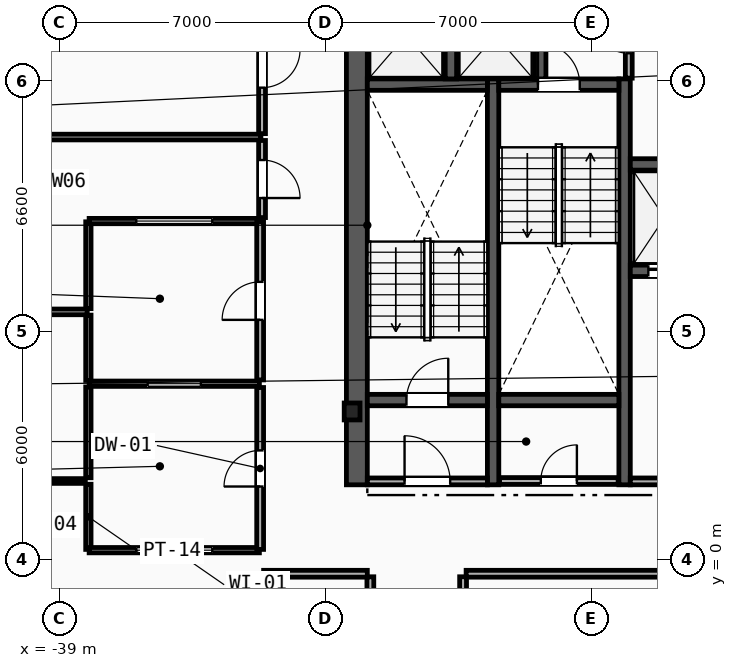
"""IFC4 building model, lengths in metres.
Left out: names, types, materials, properties, quantities, classifications, styles, units other than length and angle.
Written with IfcOpenShell. Run it as: python <this file> out.ifc"""

import sys

from ifc_helpers import new_model, si_unit, direction, frame, frame_2d, origin, origin_2d, place, context, subcontext, project, spatial, rectangle, i_section, extrude, element, fill, save


model = new_model("IFC4")
c1 = context("Model", 3, precision=1e-05, world=origin(), true_north=direction((0.0, 1.0)))
c2 = subcontext(c1, "Body", "Model", "MODEL_VIEW")
j1 = project(units=[si_unit("LENGTHUNIT", "METRE"), si_unit("PLANEANGLEUNIT", "RADIAN")], contexts=[c1])
p1 = place(None, origin())
s1 = spatial("IfcSite", under=j1, at=p1, CompositionType="ELEMENT")
p2 = place(p1, origin())
s2 = spatial("IfcBuilding", under=s1, at=p2, CompositionType="ELEMENT")
p3 = place(p2, frame((0.0, 0.0, 257.6)))
s3 = spatial("IfcBuildingStorey", under=s2, at=p3, CompositionType="ELEMENT", Elevation=257.6)
p4 = place(p3, frame((-31.3, 3.9, 0.0), z_axis=(0.0, 0.0, 1.0), x_axis=(1.0, 0.0, 0.0)))
e1 = element("IfcColumn", 1, at=p4, inside=s3, PredefinedType="COLUMN", context=c2, shape_type="SweptSolid", body=[
    extrude(i_section(OverallWidth=0.416, OverallDepth=0.446, WebThickness=0.039, FlangeThickness=0.063, FilletRadius=0.018, at=origin_2d()), origin(), (0.0, 0.0, 1.0), 3.6),
])
p5 = place(p3, frame((-31.175, 1.97, 0.0), z_axis=(0.0, 0.0, 1.0), x_axis=(0.0, 1.0, 0.0)))
e2 = element("IfcWall", 2, at=p5, inside=s3, PredefinedType="SHEAR", context=c2, shape_type="SweptSolid", body=[
    extrude(rectangle(XDim=13.33, YDim=0.55, at=frame_2d((6.665, 0.0))), origin(), (0.0, 0.0, 1.0), 3.34),
])
for number, where, z_axis, x_axis in (
    (3, (-27.59, 1.97, 0.0), (0.0, 0.0, 1.0), (0.0, 1.0, 0.0)),
    (4, (-24.13, 1.97, 0.0), (0.0, 0.0, 1.0), (0.0, 1.0, 0.0)),
):
    element("IfcWall", number, at=place(p3, frame(where, z_axis=z_axis, x_axis=x_axis)), inside=s3, PredefinedType="SHEAR", context=c2, shape_type="SweptSolid", body=[
        extrude(rectangle(XDim=10.68, YDim=0.3, at=frame_2d((5.34, 0.0))), origin(), (0.0, 0.0, 1.0), 3.34),
    ])
p6 = place(p3, frame((-30.9, 4.2, 0.0), z_axis=(0.0, 0.0, 1.0), x_axis=(1.0, 0.0, 0.0)))
e5 = element("IfcWall", 5, at=p6, inside=s3, PredefinedType="SHEAR", context=c2, shape_type="SweptSolid", body=[
    extrude(rectangle(XDim=3.16, YDim=0.3, at=frame_2d((1.58, 0.0))), origin(), (0.0, 0.0, 1.0), 3.34),
])
p7 = place(p6, frame((1.03, 0.0, 0.0)))
e6 = element("IfcOpeningElement", 6, at=p7, cuts=e5, PredefinedType="OPENING", context=c2, shape_type="SweptSolid", body=[
    extrude(rectangle(XDim=1.1, YDim=2.15, at=frame_2d((0.55, 1.075))), frame((0.0, 0.16, 0.0), z_axis=(0.0, -1.0, 0.0), x_axis=(1.0, 0.0, 0.0)), (0.0, 0.0, 1.0), 0.32),
])
p8 = place(p3, frame((-30.9, 12.5, 0.0), z_axis=(0.0, 0.0, 1.0), x_axis=(1.0, 0.0, 0.0)))
e7 = element("IfcWall", 7, at=p8, inside=s3, PredefinedType="SHEAR", context=c2, shape_type="SweptSolid", body=[
    extrude(rectangle(XDim=3.16, YDim=0.3, at=frame_2d((1.58, 0.0))), origin(), (0.0, 0.0, 1.0), 3.34),
])
p9 = place(p3, frame((-27.44, 12.5, 0.0), z_axis=(0.0, 0.0, 1.0), x_axis=(1.0, 0.0, 0.0)))
e8 = element("IfcWall", 8, at=p9, inside=s3, PredefinedType="SHEAR", context=c2, shape_type="SweptSolid", body=[
    extrude(rectangle(XDim=3.16, YDim=0.3, at=frame_2d((1.58, 0.0))), origin(), (0.0, 0.0, 1.0), 3.34),
])
p10 = place(p9, frame((1.03, 0.0, 0.0)))
e9 = element("IfcOpeningElement", 9, at=p10, cuts=e8, PredefinedType="OPENING", context=c2, shape_type="SweptSolid", body=[
    extrude(rectangle(XDim=1.1, YDim=2.15, at=frame_2d((0.55, 1.075))), frame((0.0, 0.16, 0.0), z_axis=(0.0, -1.0, 0.0), x_axis=(1.0, 0.0, 0.0)), (0.0, 0.0, 1.0), 0.32),
])
p11 = place(p3, frame((-27.44, 4.2, 0.0), z_axis=(0.0, 0.0, 1.0), x_axis=(1.0, 0.0, 0.0)))
e10 = element("IfcWall", 10, at=p11, inside=s3, PredefinedType="SHEAR", context=c2, shape_type="SweptSolid", body=[
    extrude(rectangle(XDim=3.16, YDim=0.3, at=frame_2d((1.58, 0.0))), origin(), (0.0, 0.0, 1.0), 3.34),
])
p12 = place(p3, frame((-23.98, 2.06, 0.0), z_axis=(0.0, 0.0, 1.0), x_axis=(1.0, 0.0, 0.0)))
e11 = element("IfcWall", 11, at=p12, inside=s3, PredefinedType="PARTITIONING", context=c2, shape_type="SweptSolid", body=[
    extrude(rectangle(XDim=3.0, YDim=0.18, at=frame_2d((1.5, 0.0))), origin(), (0.0, 0.0, 1.0), 3.34),
])
p13 = place(p12, frame((0.9, 0.0, 0.0)))
e12 = element("IfcOpeningElement", 12, at=p13, cuts=e11, PredefinedType="OPENING", context=c2, shape_type="SweptSolid", body=[
    extrude(rectangle(XDim=1.2, YDim=2.15, at=frame_2d((0.6, 1.075))), frame((0.0, 0.1, 0.0), z_axis=(0.0, -1.0, 0.0), x_axis=(1.0, 0.0, 0.0)), (0.0, 0.0, 1.0), 0.2),
])
p14 = place(p3, frame((-30.9, 2.06, 0.0), z_axis=(0.0, 0.0, 1.0), x_axis=(1.0, 0.0, 0.0)))
e13 = element("IfcWall", 13, at=p14, inside=s3, PredefinedType="PARTITIONING", context=c2, shape_type="SweptSolid", body=[
    extrude(rectangle(XDim=3.16, YDim=0.18, at=frame_2d((1.58, 0.0))), origin(), (0.0, 0.0, 1.0), 3.34),
])
p15 = place(p14, frame((0.98, 0.0, 0.0)))
e14 = element("IfcOpeningElement", 14, at=p15, cuts=e13, PredefinedType="OPENING", context=c2, shape_type="SweptSolid", body=[
    extrude(rectangle(XDim=1.2, YDim=2.15, at=frame_2d((0.6, 1.075))), frame((0.0, 0.1, 0.0), z_axis=(0.0, -1.0, 0.0), x_axis=(1.0, 0.0, 0.0)), (0.0, 0.0, 1.0), 0.2),
])
p16 = place(p3, frame((-23.98, 7.6, 0.0), z_axis=(0.0, 0.0, 1.0), x_axis=(1.0, 0.0, 0.0)))
e15 = element("IfcWall", 15, at=p16, inside=s3, PredefinedType="SHEAR", context=c2, shape_type="SweptSolid", body=[
    extrude(rectangle(XDim=2.1, YDim=0.3, at=frame_2d((1.05, 0.0))), origin(), (0.0, 0.0, 1.0), 3.34),
])
p17 = place(p16, frame((0.475, 0.0, 0.0)))
e16 = element("IfcOpeningElement", 16, at=p17, cuts=e15, PredefinedType="OPENING", context=c2, shape_type="SweptSolid", body=[
    extrude(rectangle(XDim=1.15, YDim=2.2, at=frame_2d((0.575, 1.1))), frame((0.0, 0.16, 0.0), z_axis=(0.0, -1.0, 0.0), x_axis=(1.0, 0.0, 0.0)), (0.0, 0.0, 1.0), 0.32),
])
p18 = place(p3, frame((-23.98, 10.4, 0.0), z_axis=(0.0, 0.0, 1.0), x_axis=(1.0, 0.0, 0.0)))
e17 = element("IfcWall", 17, at=p18, inside=s3, PredefinedType="SHEAR", context=c2, shape_type="SweptSolid", body=[
    extrude(rectangle(XDim=2.1, YDim=0.3, at=frame_2d((1.05, 0.0))), origin(), (0.0, 0.0, 1.0), 3.34),
])
for number, where, z_axis, x_axis in (
    (18, (-28.7, 12.65, 0.0), (0.0, 0.0, 1.0), (0.0, 1.0, 0.0)),
    (19, (-26.35, 12.65, 0.0), (0.0, 0.0, 1.0), (0.0, 1.0, 0.0)),
):
    element("IfcWall", number, at=place(p3, frame(where, z_axis=z_axis, x_axis=x_axis)), inside=s3, PredefinedType="SHEAR", context=c2, shape_type="SweptSolid", body=[
        extrude(rectangle(XDim=2.3, YDim=0.3, at=frame_2d((1.15, 0.0))), origin(), (0.0, 0.0, 1.0), 3.34),
    ])
p19 = place(p3, frame((-27.42, 2.07, 0.0), z_axis=(0.0, 0.0, 1.0), x_axis=(1.0, 0.0, 0.0)))
e20 = element("IfcWall", 20, at=p19, inside=s3, PredefinedType="PARTITIONING", context=c2, shape_type="SweptSolid", body=[
    extrude(rectangle(XDim=3.12, YDim=0.18, at=frame_2d((1.56, 0.0))), origin(), (0.0, 0.0, 1.0), 3.34),
])
p20 = place(p19, frame((1.085, 0.0, 0.0)))
e21 = element("IfcOpeningElement", 21, at=p20, cuts=e20, PredefinedType="OPENING", context=c2, shape_type="SweptSolid", body=[
    extrude(rectangle(XDim=0.95, YDim=2.1, at=frame_2d((0.475, 1.05))), frame((0.0, 0.1, 0.0), z_axis=(0.0, -1.0, 0.0), x_axis=(1.0, 0.0, 0.0)), (0.0, 0.0, 1.0), 0.2),
])
p21 = place(p3, frame((-24.02, 12.67, 0.0), z_axis=(0.0, 0.0, 1.0), x_axis=(0.0, 1.0, 0.0)))
e22 = element("IfcWall", 22, at=p21, inside=s3, PredefinedType="PARTITIONING", context=c2, shape_type="SweptSolid", body=[
    extrude(rectangle(XDim=2.26, YDim=0.18, at=frame_2d((1.13, 0.0))), origin(), (0.0, 0.0, 1.0), 3.34),
])
p22 = place(p21, frame((0.655, 0.0, 0.0)))
e23 = element("IfcOpeningElement", 23, at=p22, cuts=e22, PredefinedType="OPENING", context=c2, shape_type="SweptSolid", body=[
    extrude(rectangle(XDim=0.95, YDim=2.1, at=frame_2d((0.475, 1.05))), frame((0.0, 0.1, 0.0), z_axis=(0.0, -1.0, 0.0), x_axis=(1.0, 0.0, 0.0)), (0.0, 0.0, 1.0), 0.2),
])
p23 = place(p3, frame((-38.24, 0.27, 0.0), z_axis=(0.0, 0.0, 1.0), x_axis=(0.0, 1.0, 0.0)))
e24 = element("IfcWall", 24, at=p23, inside=s3, PredefinedType="PARTITIONING", context=c2, shape_type="SweptSolid", body=[
    extrude(rectangle(XDim=1.715, YDim=0.14, at=frame_2d((0.857, 0.0))), origin(), (0.0, 0.0, 1.0), 3.34),
])
p24 = place(p3, frame((-38.24, 2.155, 0.0), z_axis=(0.0, 0.0, 1.0), x_axis=(0.0, 1.0, 0.0)))
e25 = element("IfcWall", 25, at=p24, inside=s3, PredefinedType="PARTITIONING", context=c2, shape_type="SweptSolid", body=[
    extrude(rectangle(XDim=2.39, YDim=0.14, at=frame_2d((1.195, 0.0))), origin(), (0.0, 0.0, 1.0), 3.34),
])
p25 = place(p3, frame((-38.24, 4.715, 0.0), z_axis=(0.0, 0.0, 1.0), x_axis=(0.0, 1.0, 0.0)))
e26 = element("IfcWall", 26, at=p25, inside=s3, PredefinedType="PARTITIONING", context=c2, shape_type="SweptSolid", body=[
    extrude(rectangle(XDim=1.72, YDim=0.14, at=frame_2d((0.86, 0.0))), origin(), (0.0, 0.0, 1.0), 3.34),
])
p26 = place(p3, frame((-38.24, 6.605, 0.0), z_axis=(0.0, 0.0, 1.0), x_axis=(0.0, 1.0, 0.0)))
e27 = element("IfcWall", 27, at=p26, inside=s3, PredefinedType="PARTITIONING", context=c2, shape_type="SweptSolid", body=[
    extrude(rectangle(XDim=2.285, YDim=0.14, at=frame_2d((1.143, 0.0))), origin(), (0.0, 0.0, 1.0), 3.34),
])
p27 = place(p3, frame((-38.22, 0.25, 0.0), z_axis=(0.0, 0.0, 1.0), x_axis=(1.0, 0.0, 0.0)))
e28 = element("IfcWall", 28, at=p27, inside=s3, PredefinedType="PARTITIONING", context=c2, shape_type="SweptSolid", body=[
    extrude(rectangle(XDim=4.48, YDim=0.14, at=frame_2d((2.24, 0.0))), origin(), (0.0, 0.0, 1.0), 3.34),
])
p28 = place(p27, frame((1.24, 0.0, 1.05)))
e29 = element("IfcOpeningElement", 29, at=p28, cuts=e28, PredefinedType="OPENING", context=c2, shape_type="SweptSolid", body=[
    extrude(rectangle(XDim=2.0, YDim=1.5, at=frame_2d((1.0, 0.75))), frame((0.0, 0.08, 0.0), z_axis=(0.0, -1.0, 0.0), x_axis=(1.0, 0.0, 0.0)), (0.0, 0.0, 1.0), 0.16),
])
p29 = place(p3, frame((-38.22, 4.63, 0.0), z_axis=(0.0, 0.0, 1.0), x_axis=(1.0, 0.0, 0.0)))
e30 = element("IfcWall", 30, at=p29, inside=s3, PredefinedType="PARTITIONING", context=c2, shape_type="SweptSolid", body=[
    extrude(rectangle(XDim=4.48, YDim=0.14, at=frame_2d((2.24, 0.0))), origin(), (0.0, 0.0, 1.0), 3.34),
])
p30 = place(p29, frame((1.54, 0.0, 1.05)))
e31 = element("IfcOpeningElement", 31, at=p30, cuts=e30, PredefinedType="OPENING", context=c2, shape_type="SweptSolid", body=[
    extrude(rectangle(XDim=1.4, YDim=1.5, at=frame_2d((0.7, 0.75))), frame((0.0, 0.08, 0.0), z_axis=(0.0, -1.0, 0.0), x_axis=(1.0, 0.0, 0.0)), (0.0, 0.0, 1.0), 0.16),
])
p31 = place(p3, frame((-38.22, 8.91, 0.0), z_axis=(0.0, 0.0, 1.0), x_axis=(1.0, 0.0, 0.0)))
e32 = element("IfcWall", 32, at=p31, inside=s3, PredefinedType="PARTITIONING", context=c2, shape_type="SweptSolid", body=[
    extrude(rectangle(XDim=4.48, YDim=0.14, at=frame_2d((2.24, 0.0))), origin(), (0.0, 0.0, 1.0), 3.34),
])
p32 = place(p31, frame((1.24, 0.0, 1.05)))
e33 = element("IfcOpeningElement", 33, at=p32, cuts=e32, PredefinedType="OPENING", context=c2, shape_type="SweptSolid", body=[
    extrude(rectangle(XDim=2.0, YDim=1.5, at=frame_2d((1.0, 0.75))), frame((0.0, 0.08, 0.0), z_axis=(0.0, -1.0, 0.0), x_axis=(1.0, 0.0, 0.0)), (0.0, 0.0, 1.0), 0.16),
])
p33 = place(p3, frame((-33.72, 0.27, 0.0), z_axis=(0.0, 0.0, 1.0), x_axis=(0.0, 1.0, 0.0)))
e34 = element("IfcWall", 34, at=p33, inside=s3, PredefinedType="PARTITIONING", context=c2, shape_type="SweptSolid", body=[
    extrude(rectangle(XDim=4.26, YDim=0.18, at=frame_2d((2.13, 0.0))), origin(), (0.0, 0.0, 1.0), 3.34),
])
p34 = place(p33, frame((1.655, 0.0, 0.0)))
e35 = element("IfcOpeningElement", 35, at=p34, cuts=e34, PredefinedType="OPENING", context=c2, shape_type="SweptSolid", body=[
    extrude(rectangle(XDim=0.95, YDim=2.1, at=frame_2d((0.475, 1.05))), frame((0.0, 0.1, 0.0), z_axis=(0.0, -1.0, 0.0), x_axis=(1.0, 0.0, 0.0)), (0.0, 0.0, 1.0), 0.2),
])
p35 = place(p3, frame((-33.72, 4.73, 0.0), z_axis=(0.0, 0.0, 1.0), x_axis=(0.0, 1.0, 0.0)))
e36 = element("IfcWall", 36, at=p35, inside=s3, PredefinedType="PARTITIONING", context=c2, shape_type="SweptSolid", body=[
    extrude(rectangle(XDim=4.16, YDim=0.18, at=frame_2d((2.08, 0.0))), origin(), (0.0, 0.0, 1.0), 3.34),
])
p36 = place(p35, frame((1.58, 0.0, 0.0)))
e37 = element("IfcOpeningElement", 37, at=p36, cuts=e36, PredefinedType="OPENING", context=c2, shape_type="SweptSolid", body=[
    extrude(rectangle(XDim=1.0, YDim=2.15, at=frame_2d((0.5, 1.075))), frame((0.0, 0.1, 0.0), z_axis=(0.0, -1.0, 0.0), x_axis=(1.0, 0.0, 0.0)), (0.0, 0.0, 1.0), 0.2),
])
p37 = place(p3, frame((-50.79, 6.52, 0.0), z_axis=(0.0, 0.0, 1.0), x_axis=(1.0, 0.0, 0.0)))
e38 = element("IfcWall", 38, at=p37, inside=s3, PredefinedType="PARTITIONING", context=c2, shape_type="SweptSolid", body=[
    extrude(rectangle(XDim=12.52, YDim=0.15, at=frame_2d((6.26, 0.0))), origin(), (0.0, 0.0, 1.0), 3.34),
])
p38 = place(p3, frame((-50.007, 11.12, 0.0), z_axis=(0.0, 0.0, 1.0), x_axis=(1.0, 0.0, 0.0)))
e39 = element("IfcWall", 39, at=p38, inside=s3, PredefinedType="PARTITIONING", context=c2, shape_type="SweptSolid", body=[
    extrude(rectangle(XDim=16.307, YDim=0.15, at=frame_2d((8.153, 0.0))), origin(), (0.0, 0.0, 1.0), 3.34),
])
p39 = place(p3, frame((-28.3, -0.37, 0.0), z_axis=(0.0, 0.0, 1.0), x_axis=(1.0, 0.0, 0.0)))
e40 = element("IfcWall", 40, at=p39, inside=s3, PredefinedType="PARTITIONING", context=c2, shape_type="SweptSolid", body=[
    extrude(rectangle(XDim=15.349, YDim=0.18, at=frame_2d((7.675, 0.0))), origin(), (0.0, 0.0, 1.0), 3.34),
])
p40 = place(p39, frame((7.175, 0.0, 0.0)))
e41 = element("IfcOpeningElement", 41, at=p40, cuts=e40, PredefinedType="OPENING", context=c2, shape_type="SweptSolid", body=[
    extrude(rectangle(XDim=1.0, YDim=2.15, at=frame_2d((0.5, 1.075))), frame((0.0, 0.1, 0.0), z_axis=(0.0, -1.0, 0.0), x_axis=(1.0, 0.0, 0.0)), (0.0, 0.0, 1.0), 0.2),
])
p41 = place(p3, frame((-28.38, -9.99, 0.0), z_axis=(0.0, 0.0, 1.0), x_axis=(0.0, 1.0, 0.0)))
e42 = element("IfcWall", 42, at=p41, inside=s3, PredefinedType="PARTITIONING", context=c2, shape_type="SweptSolid", body=[
    extrude(rectangle(XDim=9.54, YDim=0.18, at=frame_2d((4.77, 0.0))), origin(), (0.0, 0.0, 1.0), 3.34),
])
p42 = place(p41, frame((3.77, 0.0, 1.05)))
e43 = element("IfcOpeningElement", 43, at=p42, cuts=e42, PredefinedType="OPENING", context=c2, shape_type="SweptSolid", body=[
    extrude(rectangle(XDim=2.0, YDim=1.5, at=frame_2d((1.0, 0.75))), frame((0.0, 0.1, 0.0), z_axis=(0.0, -1.0, 0.0), x_axis=(1.0, 0.0, 0.0)), (0.0, 0.0, 1.0), 0.2),
])
p43 = place(p3, frame((-30.82, -0.45, 0.0), z_axis=(0.0, 0.0, 1.0), x_axis=(0.0, -1.0, 0.0)))
e44 = element("IfcWall", 44, at=p43, inside=s3, PredefinedType="PARTITIONING", context=c2, shape_type="SweptSolid", body=[
    extrude(rectangle(XDim=9.54, YDim=0.18, at=frame_2d((4.77, 0.0))), origin(), (0.0, 0.0, 1.0), 3.34),
])
p44 = place(p43, frame((4.27, 0.0, 0.0)))
e45 = element("IfcOpeningElement", 45, at=p44, cuts=e44, PredefinedType="OPENING", context=c2, shape_type="SweptSolid", body=[
    extrude(rectangle(XDim=1.0, YDim=2.15, at=frame_2d((0.5, 1.075))), frame((0.0, 0.1, 0.0), z_axis=(0.0, -1.0, 0.0), x_axis=(1.0, 0.0, 0.0)), (0.0, 0.0, 1.0), 0.2),
])
p45 = place(p3, frame((-33.628, -0.37, 0.0), z_axis=(0.0, 0.0, 1.0), x_axis=(1.0, 0.0, 0.0)))
e46 = element("IfcWall", 46, at=p45, inside=s3, PredefinedType="PARTITIONING", context=c2, shape_type="SweptSolid", body=[
    extrude(rectangle(XDim=2.729, YDim=0.18, at=frame_2d((1.364, 0.0))), origin(), (0.0, 0.0, 1.0), 3.34),
])
p46 = place(p3, frame((-33.67, 11.03, 0.0), z_axis=(0.0, 0.0, 1.0), x_axis=(0.0, -1.0, 0.0)))
e47 = element("IfcWall", 47, at=p46, inside=s3, PredefinedType="PARTITIONING", context=c2, shape_type="SweptSolid", body=[
    extrude(rectangle(XDim=2.029, YDim=0.18, at=frame_2d((1.014, 0.0))), origin(), (0.0, 0.0, 1.0), 3.34),
])
p47 = place(p46, frame((0.514, 0.0, 0.0)))
e48 = element("IfcOpeningElement", 48, at=p47, cuts=e47, PredefinedType="OPENING", context=c2, shape_type="SweptSolid", body=[
    extrude(rectangle(XDim=1.0, YDim=2.15, at=frame_2d((0.5, 1.075))), frame((0.0, 0.1, 0.0), z_axis=(0.0, -1.0, 0.0), x_axis=(1.0, 0.0, 0.0)), (0.0, 0.0, 1.0), 0.2),
])
p48 = place(p3, frame((-33.67, 14.63, 0.0), z_axis=(0.0, 0.0, 1.0), x_axis=(0.0, -1.0, 0.0)))
e49 = element("IfcWall", 49, at=p48, inside=s3, PredefinedType="PARTITIONING", context=c2, shape_type="SweptSolid", body=[
    extrude(rectangle(XDim=3.42, YDim=0.18, at=frame_2d((1.71, 0.0))), origin(), (0.0, 0.0, 1.0), 3.34),
])
p49 = place(p48, frame((1.21, 0.0, 0.0)))
e50 = element("IfcOpeningElement", 50, at=p49, cuts=e49, PredefinedType="OPENING", context=c2, shape_type="SweptSolid", body=[
    extrude(rectangle(XDim=1.0, YDim=2.15, at=frame_2d((0.5, 1.075))), frame((0.0, 0.1, 0.0), z_axis=(0.0, -1.0, 0.0), x_axis=(1.0, 0.0, 0.0)), (0.0, 0.0, 1.0), 0.2),
])
p50 = place(p3, frame((-38.32, 2.07, 0.0), z_axis=(0.0, 0.0, 1.0), x_axis=(-1.0, 0.0, 0.0)))
e51 = element("IfcWall", 51, at=p50, inside=s3, PredefinedType="PARTITIONING", context=c2, shape_type="SweptSolid", body=[
    extrude(rectangle(XDim=12.729, YDim=0.125, at=frame_2d((6.365, 0.0))), origin(), (0.0, 0.0, 1.0), 3.34),
])
p51 = place(p50, frame((5.865, 0.0, 0.0)))
e52 = element("IfcOpeningElement", 52, at=p51, cuts=e51, PredefinedType="OPENING", context=c2, shape_type="SweptSolid", body=[
    extrude(rectangle(XDim=1.0, YDim=2.15, at=frame_2d((0.5, 1.075))), frame((0.0, 0.073, 0.0), z_axis=(0.0, -1.0, 0.0), x_axis=(1.0, 0.0, 0.0)), (0.0, 0.0, 1.0), 0.145),
])
p52 = place(p7, origin())
e53 = element("IfcDoor", 53, at=p52, inside=s3, OperationType="SINGLE_SWING_RIGHT", PredefinedType="DOOR", context=c2, shape_type="SweptSolid", body=[
    extrude(rectangle(XDim=1.1, YDim=2.15, at=frame_2d((0.55, 1.075))), frame((0.0, 0.025, 0.0), z_axis=(0.0, -1.0, 0.0), x_axis=(1.0, 0.0, 0.0)), (0.0, 0.0, 1.0), 0.05),
])
fill(e6, e53)
p53 = place(p10, origin())
e54 = element("IfcDoor", 54, at=p53, inside=s3, OperationType="SINGLE_SWING_LEFT", PredefinedType="DOOR", context=c2, shape_type="SweptSolid", body=[
    extrude(rectangle(XDim=1.1, YDim=2.15, at=frame_2d((0.55, 1.075))), frame((0.0, 0.025, 0.0), z_axis=(0.0, -1.0, 0.0), x_axis=(1.0, 0.0, 0.0)), (0.0, 0.0, 1.0), 0.05),
])
fill(e9, e54)
p54 = place(p15, origin())
e55 = element("IfcDoor", 55, at=p54, inside=s3, OperationType="SINGLE_SWING_LEFT", PredefinedType="DOOR", context=c2, shape_type="SweptSolid", body=[
    extrude(rectangle(XDim=1.2, YDim=2.15, at=frame_2d((0.6, 1.075))), frame((0.0, 0.025, 0.0), z_axis=(0.0, -1.0, 0.0), x_axis=(1.0, 0.0, 0.0)), (0.0, 0.0, 1.0), 0.05),
])
fill(e14, e55)
p55 = place(p17, origin())
e56 = element("IfcDoor", 56, at=p55, inside=s3, OperationType="SLIDING_TO_LEFT", PredefinedType="TRAPDOOR", context=c2, shape_type="SweptSolid", body=[
    extrude(rectangle(XDim=1.15, YDim=2.2, at=frame_2d((0.575, 1.1))), frame((0.0, 0.025, 0.0), z_axis=(0.0, -1.0, 0.0), x_axis=(1.0, 0.0, 0.0)), (0.0, 0.0, 1.0), 0.05),
])
fill(e16, e56)
p56 = place(p34, origin())
e57 = element("IfcDoor", 57, at=p56, inside=s3, OperationType="SINGLE_SWING_LEFT", PredefinedType="DOOR", context=c2, shape_type="SweptSolid", body=[
    extrude(rectangle(XDim=0.95, YDim=2.1, at=frame_2d((0.475, 1.05))), frame((0.0, 0.025, 0.0), z_axis=(0.0, -1.0, 0.0), x_axis=(1.0, 0.0, 0.0)), (0.0, 0.0, 1.0), 0.05),
])
fill(e35, e57)
p57 = place(p36, origin())
e58 = element("IfcDoor", 58, at=p57, inside=s3, OperationType="SINGLE_SWING_LEFT", PredefinedType="DOOR", context=c2, shape_type="SweptSolid", body=[
    extrude(rectangle(XDim=1.0, YDim=2.15, at=frame_2d((0.5, 1.075))), frame((0.0, 0.025, 0.0), z_axis=(0.0, -1.0, 0.0), x_axis=(1.0, 0.0, 0.0)), (0.0, 0.0, 1.0), 0.05),
])
fill(e37, e58)
p58 = place(p49, origin())
e59 = element("IfcDoor", 59, at=p58, inside=s3, OperationType="SINGLE_SWING_LEFT", PredefinedType="DOOR", context=c2, shape_type="SweptSolid", body=[
    extrude(rectangle(XDim=1.0, YDim=2.15, at=frame_2d((0.5, 1.075))), frame((0.0, 0.025, 0.0), z_axis=(0.0, -1.0, 0.0), x_axis=(1.0, 0.0, 0.0)), (0.0, 0.0, 1.0), 0.05),
])
fill(e50, e59)
p59 = place(p20, origin())
e60 = element("IfcDoor", 60, at=p59, inside=s3, OperationType="SINGLE_SWING_RIGHT", PredefinedType="DOOR", context=c2, shape_type="SweptSolid", body=[
    extrude(rectangle(XDim=0.95, YDim=2.1, at=frame_2d((0.475, 1.05))), frame((0.0, 0.025, 0.0), z_axis=(0.0, -1.0, 0.0), x_axis=(1.0, 0.0, 0.0)), (0.0, 0.0, 1.0), 0.05),
])
fill(e21, e60)
p60 = place(p22, origin())
e61 = element("IfcDoor", 61, at=p60, inside=s3, OperationType="SINGLE_SWING_RIGHT", PredefinedType="DOOR", context=c2, shape_type="SweptSolid", body=[
    extrude(rectangle(XDim=0.95, YDim=2.1, at=frame_2d((0.475, 1.05))), frame((0.0, 0.025, 0.0), z_axis=(0.0, -1.0, 0.0), x_axis=(1.0, 0.0, 0.0)), (0.0, 0.0, 1.0), 0.05),
])
fill(e23, e61)
p61 = place(p47, origin())
e62 = element("IfcDoor", 62, at=p61, inside=s3, OperationType="SINGLE_SWING_RIGHT", PredefinedType="DOOR", context=c2, shape_type="SweptSolid", body=[
    extrude(rectangle(XDim=1.0, YDim=2.15, at=frame_2d((0.5, 1.075))), frame((0.0, 0.025, 0.0), z_axis=(0.0, -1.0, 0.0), x_axis=(1.0, 0.0, 0.0)), (0.0, 0.0, 1.0), 0.05),
])
fill(e48, e62)
p62 = place(p28, origin())
e63 = element("IfcWindow", 63, at=p62, inside=s3, PartitioningType="SINGLE_PANEL", PredefinedType="WINDOW", context=c2, shape_type="SweptSolid", body=[
    extrude(rectangle(XDim=2.0, YDim=1.5, at=frame_2d((1.0, 0.75))), frame((0.0, 0.03, 0.0), z_axis=(0.0, -1.0, 0.0), x_axis=(1.0, 0.0, 0.0)), (0.0, 0.0, 1.0), 0.06),
])
fill(e29, e63)
p63 = place(p30, origin())
e64 = element("IfcWindow", 64, at=p63, inside=s3, PartitioningType="SINGLE_PANEL", PredefinedType="WINDOW", context=c2, shape_type="SweptSolid", body=[
    extrude(rectangle(XDim=1.4, YDim=1.5, at=frame_2d((0.7, 0.75))), frame((0.0, 0.03, 0.0), z_axis=(0.0, -1.0, 0.0), x_axis=(1.0, 0.0, 0.0)), (0.0, 0.0, 1.0), 0.06),
])
fill(e31, e64)
p64 = place(p32, origin())
e65 = element("IfcWindow", 65, at=p64, inside=s3, PartitioningType="SINGLE_PANEL", PredefinedType="WINDOW", context=c2, shape_type="SweptSolid", body=[
    extrude(rectangle(XDim=2.0, YDim=1.5, at=frame_2d((1.0, 0.75))), frame((0.0, 0.03, 0.0), z_axis=(0.0, -1.0, 0.0), x_axis=(1.0, 0.0, 0.0)), (0.0, 0.0, 1.0), 0.06),
])
fill(e33, e65)
save(model, sys.argv[1])
